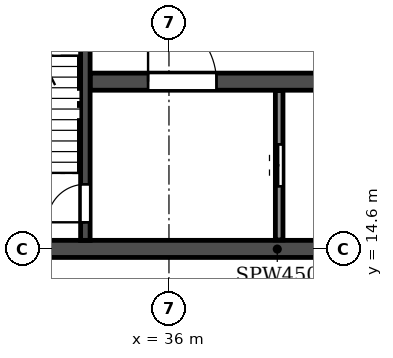
"""IFC4 building model, lengths in metres.
Left out: names, types, materials, properties, quantities, classifications, styles, units other than length and angle.
Written with IfcOpenShell. Run it as: python <this file> out.ifc"""

import sys

from ifc_helpers import new_model, si_unit, direction, frame, frame_2d, origin, place, context, subcontext, project, spatial, rectangle, extrude, element, fill, save


model = new_model("IFC4")
c1 = context("Model", 3, precision=1e-05, world=origin(), true_north=direction((0.0, 1.0)))
c2 = subcontext(c1, "Body", "Model", "MODEL_VIEW")
j1 = project(units=[si_unit("LENGTHUNIT", "METRE"), si_unit("PLANEANGLEUNIT", "RADIAN")], contexts=[c1])
p1 = place(None, origin())
s1 = spatial("IfcSite", under=j1, at=p1, CompositionType="ELEMENT")
p2 = place(p1, origin())
s2 = spatial("IfcBuilding", under=s1, at=p2, CompositionType="ELEMENT")
p3 = place(p2, frame((0.0, 0.0, 142.2)))
s3 = spatial("IfcBuildingStorey", under=s2, at=p3, CompositionType="ELEMENT", Elevation=142.2)
p4 = place(p3, frame((12.2, 14.6, 0.0), z_axis=(0.0, 0.0, 1.0), x_axis=(1.0, 0.0, 0.0)))
e1 = element("IfcWall", 1, at=p4, inside=s3, PredefinedType="SOLIDWALL", context=c2, shape_type="SweptSolid", body=[
    extrude(rectangle(XDim=77.6, YDim=0.45, at=frame_2d((38.8, 0.0))), origin(), (0.0, 0.0, 1.0), 3.07),
])
p5 = place(p4, frame((0.8, 0.0, 0.0)))
e2 = element("IfcOpeningElement", 2, at=p5, cuts=e1, PredefinedType="OPENING", context=c2, shape_type="SweptSolid", body=[
    extrude(rectangle(XDim=1.0, YDim=2.1, at=frame_2d((0.5, 1.05))), frame((0.0, 0.235, 0.0), z_axis=(0.0, -1.0, 0.0), x_axis=(1.0, 0.0, 0.0)), (0.0, 0.0, 1.0), 0.47),
])
p6 = place(p4, frame((3.8, 0.0, 0.0)))
e3 = element("IfcOpeningElement", 3, at=p6, cuts=e1, PredefinedType="OPENING", context=c2, shape_type="SweptSolid", body=[
    extrude(rectangle(XDim=1.0, YDim=2.1, at=frame_2d((0.5, 1.05))), frame((0.0, 0.235, 0.0), z_axis=(0.0, -1.0, 0.0), x_axis=(1.0, 0.0, 0.0)), (0.0, 0.0, 1.0), 0.47),
])
p7 = place(p4, frame((6.7, 0.0, 0.0)))
e4 = element("IfcOpeningElement", 4, at=p7, cuts=e1, PredefinedType="OPENING", context=c2, shape_type="SweptSolid", body=[
    extrude(rectangle(XDim=1.0, YDim=2.1, at=frame_2d((0.5, 1.05))), frame((0.0, 0.235, 0.0), z_axis=(0.0, -1.0, 0.0), x_axis=(1.0, 0.0, 0.0)), (0.0, 0.0, 1.0), 0.47),
])
p8 = place(p4, frame((14.6, 0.0, 0.0)))
e5 = element("IfcOpeningElement", 5, at=p8, cuts=e1, PredefinedType="OPENING", context=c2, shape_type="SweptSolid", body=[
    extrude(rectangle(XDim=1.0, YDim=2.1, at=frame_2d((0.5, 1.05))), frame((0.0, 0.235, 0.0), z_axis=(0.0, -1.0, 0.0), x_axis=(1.0, 0.0, 0.0)), (0.0, 0.0, 1.0), 0.47),
])
p9 = place(p4, frame((19.2, 0.0, 0.0)))
e6 = element("IfcOpeningElement", 6, at=p9, cuts=e1, PredefinedType="OPENING", context=c2, shape_type="SweptSolid", body=[
    extrude(rectangle(XDim=1.0, YDim=2.1, at=frame_2d((0.5, 1.05))), frame((0.0, 0.235, 0.0), z_axis=(0.0, -1.0, 0.0), x_axis=(1.0, 0.0, 0.0)), (0.0, 0.0, 1.0), 0.47),
])
p10 = place(p4, frame((33.1, 0.0, 0.0)))
e7 = element("IfcOpeningElement", 7, at=p10, cuts=e1, PredefinedType="OPENING", context=c2, shape_type="SweptSolid", body=[
    extrude(rectangle(XDim=1.0, YDim=2.1, at=frame_2d((0.5, 1.05))), frame((0.0, 0.235, 0.0), z_axis=(0.0, -1.0, 0.0), x_axis=(1.0, 0.0, 0.0)), (0.0, 0.0, 1.0), 0.47),
])
p11 = place(p4, frame((38.3, 0.0, 0.0)))
e8 = element("IfcOpeningElement", 8, at=p11, cuts=e1, PredefinedType="OPENING", context=c2, shape_type="SweptSolid", body=[
    extrude(rectangle(XDim=1.0, YDim=2.1, at=frame_2d((0.5, 1.05))), frame((0.0, 0.235, 0.0), z_axis=(0.0, -1.0, 0.0), x_axis=(1.0, 0.0, 0.0)), (0.0, 0.0, 1.0), 0.47),
])
p12 = place(p4, frame((40.9, 0.0, 0.0)))
e9 = element("IfcOpeningElement", 9, at=p12, cuts=e1, PredefinedType="OPENING", context=c2, shape_type="SweptSolid", body=[
    extrude(rectangle(XDim=1.0, YDim=2.1, at=frame_2d((0.5, 1.05))), frame((0.0, 0.235, 0.0), z_axis=(0.0, -1.0, 0.0), x_axis=(1.0, 0.0, 0.0)), (0.0, 0.0, 1.0), 0.47),
])
p13 = place(p4, frame((44.8, 0.0, 0.0)))
e10 = element("IfcOpeningElement", 10, at=p13, cuts=e1, PredefinedType="OPENING", context=c2, shape_type="SweptSolid", body=[
    extrude(rectangle(XDim=1.0, YDim=2.1, at=frame_2d((0.5, 1.05))), frame((0.0, 0.235, 0.0), z_axis=(0.0, -1.0, 0.0), x_axis=(1.0, 0.0, 0.0)), (0.0, 0.0, 1.0), 0.47),
])
p14 = place(p4, frame((57.4, 0.0, 0.0)))
e11 = element("IfcOpeningElement", 11, at=p14, cuts=e1, PredefinedType="OPENING", context=c2, shape_type="SweptSolid", body=[
    extrude(rectangle(XDim=1.0, YDim=2.1, at=frame_2d((0.5, 1.05))), frame((0.0, 0.235, 0.0), z_axis=(0.0, -1.0, 0.0), x_axis=(1.0, 0.0, 0.0)), (0.0, 0.0, 1.0), 0.47),
])
p15 = place(p4, frame((62.0, 0.0, 0.0)))
e12 = element("IfcOpeningElement", 12, at=p15, cuts=e1, PredefinedType="OPENING", context=c2, shape_type="SweptSolid", body=[
    extrude(rectangle(XDim=1.0, YDim=2.1, at=frame_2d((0.5, 1.05))), frame((0.0, 0.235, 0.0), z_axis=(0.0, -1.0, 0.0), x_axis=(1.0, 0.0, 0.0)), (0.0, 0.0, 1.0), 0.47),
])
p16 = place(p4, frame((69.9, 0.0, 0.0)))
e13 = element("IfcOpeningElement", 13, at=p16, cuts=e1, PredefinedType="OPENING", context=c2, shape_type="SweptSolid", body=[
    extrude(rectangle(XDim=1.0, YDim=2.1, at=frame_2d((0.5, 1.05))), frame((0.0, 0.235, 0.0), z_axis=(0.0, -1.0, 0.0), x_axis=(1.0, 0.0, 0.0)), (0.0, 0.0, 1.0), 0.47),
])
p17 = place(p4, frame((72.8, 0.0, 0.0)))
e14 = element("IfcOpeningElement", 14, at=p17, cuts=e1, PredefinedType="OPENING", context=c2, shape_type="SweptSolid", body=[
    extrude(rectangle(XDim=1.0, YDim=2.1, at=frame_2d((0.5, 1.05))), frame((0.0, 0.235, 0.0), z_axis=(0.0, -1.0, 0.0), x_axis=(1.0, 0.0, 0.0)), (0.0, 0.0, 1.0), 0.47),
])
p18 = place(p4, frame((75.8, 0.0, 0.0)))
e15 = element("IfcOpeningElement", 15, at=p18, cuts=e1, PredefinedType="OPENING", context=c2, shape_type="SweptSolid", body=[
    extrude(rectangle(XDim=1.0, YDim=2.1, at=frame_2d((0.5, 1.05))), frame((0.0, 0.235, 0.0), z_axis=(0.0, -1.0, 0.0), x_axis=(1.0, 0.0, 0.0)), (0.0, 0.0, 1.0), 0.47),
])
p19 = place(p3, frame((33.925, 19.0, 0.0), z_axis=(0.0, 0.0, 1.0), x_axis=(1.0, 0.0, 0.0)))
e16 = element("IfcWall", 16, at=p19, inside=s3, PredefinedType="SOLIDWALL", context=c2, shape_type="SweptSolid", body=[
    extrude(rectangle(XDim=34.15, YDim=0.45, at=frame_2d((17.075, 0.0))), origin(), (0.0, 0.0, 1.0), 3.07),
])
p20 = place(p19, frame((16.175, 0.0, 0.0)))
e17 = element("IfcOpeningElement", 17, at=p20, cuts=e16, PredefinedType="OPENING", context=c2, shape_type="SweptSolid", body=[
    extrude(rectangle(XDim=1.8, YDim=2.1, at=frame_2d((0.9, 1.05))), frame((0.0, 0.235, 0.0), z_axis=(0.0, -1.0, 0.0), x_axis=(1.0, 0.0, 0.0)), (0.0, 0.0, 1.0), 0.47),
])
p21 = place(p19, frame((1.525, 0.0, 0.0)))
e18 = element("IfcOpeningElement", 18, at=p21, cuts=e16, PredefinedType="OPENING", context=c2, shape_type="SweptSolid", body=[
    extrude(rectangle(XDim=1.8, YDim=2.1, at=frame_2d((0.9, 1.05))), frame((0.0, 0.235, 0.0), z_axis=(0.0, -1.0, 0.0), x_axis=(1.0, 0.0, 0.0)), (0.0, 0.0, 1.0), 0.47),
])
p22 = place(p19, frame((30.825, 0.0, 0.0)))
e19 = element("IfcOpeningElement", 19, at=p22, cuts=e16, PredefinedType="OPENING", context=c2, shape_type="SweptSolid", body=[
    extrude(rectangle(XDim=1.8, YDim=2.1, at=frame_2d((0.9, 1.05))), frame((0.0, 0.235, 0.0), z_axis=(0.0, -1.0, 0.0), x_axis=(1.0, 0.0, 0.0)), (0.0, 0.0, 1.0), 0.47),
])
p23 = place(p3, frame((33.8, 14.825, 0.0), z_axis=(0.0, 0.0, 1.0), x_axis=(0.0, 1.0, 0.0)))
e20 = element("IfcWall", 20, at=p23, inside=s3, PredefinedType="SOLIDWALL", context=c2, shape_type="SweptSolid", body=[
    extrude(rectangle(XDim=7.65, YDim=0.25, at=frame_2d((3.825, 0.0))), origin(), (0.0, 0.0, 1.0), 3.07),
])
p24 = place(p23, frame((0.475, 0.0, 0.0)))
e21 = element("IfcOpeningElement", 21, at=p24, cuts=e20, PredefinedType="OPENING", context=c2, shape_type="SweptSolid", body=[
    extrude(rectangle(XDim=1.0, YDim=2.1, at=frame_2d((0.5, 1.05))), frame((0.0, 0.135, 0.0), z_axis=(0.0, -1.0, 0.0), x_axis=(1.0, 0.0, 0.0)), (0.0, 0.0, 1.0), 0.27),
])
p25 = place(p3, frame((38.9, 14.835, 0.0), z_axis=(0.0, 0.0, 1.0), x_axis=(0.0, 1.0, 0.0)))
e22 = element("IfcWall", 22, at=p25, inside=s3, PredefinedType="PARTITIONING", context=c2, shape_type="SweptSolid", body=[
    extrude(rectangle(XDim=3.93, YDim=0.2, at=frame_2d((1.965, 0.0))), origin(), (0.0, 0.0, 1.0), 3.07),
])
p26 = place(p25, frame((1.415, 0.0, 0.0)))
e23 = element("IfcOpeningElement", 23, at=p26, cuts=e22, PredefinedType="OPENING", context=c2, shape_type="SweptSolid", body=[
    extrude(rectangle(XDim=1.1, YDim=2.1, at=frame_2d((0.55, 1.05))), frame((0.0, 0.11, 0.0), z_axis=(0.0, -1.0, 0.0), x_axis=(1.0, 0.0, 0.0)), (0.0, 0.0, 1.0), 0.22),
])
p27 = place(p24, origin())
e24 = element("IfcDoor", 24, at=p27, inside=s3, OperationType="SINGLE_SWING_LEFT", PredefinedType="DOOR", context=c2, shape_type="SweptSolid", body=[
    extrude(rectangle(XDim=1.0, YDim=2.1, at=frame_2d((0.5, 1.05))), frame((0.0, 0.025, 0.0), z_axis=(0.0, -1.0, 0.0), x_axis=(1.0, 0.0, 0.0)), (0.0, 0.0, 1.0), 0.05),
])
fill(e21, e24)
p28 = place(p26, origin())
e25 = element("IfcDoor", 25, at=p28, inside=s3, OperationType="DOUBLE_DOOR_SLIDING", PredefinedType="DOOR", context=c2, shape_type="SweptSolid", body=[
    extrude(rectangle(XDim=1.1, YDim=2.1, at=frame_2d((0.55, 1.05))), frame((0.0, 0.025, 0.0), z_axis=(0.0, -1.0, 0.0), x_axis=(1.0, 0.0, 0.0)), (0.0, 0.0, 1.0), 0.05),
])
fill(e23, e25)
p29 = place(p21, origin())
e26 = element("IfcDoor", 26, at=p29, inside=s3, OperationType="DOUBLE_DOOR_SINGLE_SWING", PredefinedType="DOOR", context=c2, shape_type="SweptSolid", body=[
    extrude(rectangle(XDim=1.8, YDim=2.1, at=frame_2d((0.9, 1.05))), frame((0.0, 0.025, 0.0), z_axis=(0.0, -1.0, 0.0), x_axis=(1.0, 0.0, 0.0)), (0.0, 0.0, 1.0), 0.05),
])
fill(e18, e26)
save(model, sys.argv[1])
